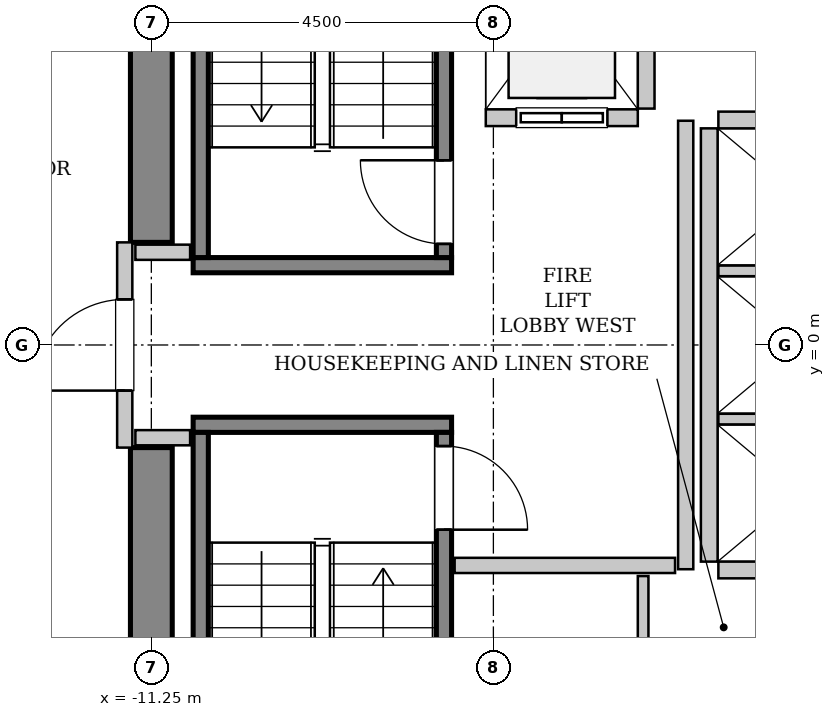
"""IFC4 building model, lengths in metres.
Left out: names, types, materials, properties, quantities, classifications, styles, units other than length and angle.
Written with IfcOpenShell. Run it as: python <this file> out.ifc"""

import sys

from ifc_helpers import new_model, si_unit, direction, frame, frame_2d, origin, place, context, subcontext, project, spatial, rectangle, extrude, source, transform, mapped, element, fill, save


model = new_model("IFC4")
c1 = context("Model", 3, precision=1e-05, world=origin(), true_north=direction((0.0, 1.0)))
c2 = subcontext(c1, "Body", "Model", "MODEL_VIEW")
j1 = project(units=[si_unit("LENGTHUNIT", "METRE"), si_unit("PLANEANGLEUNIT", "RADIAN")], contexts=[c1])
p1 = place(None, origin())
s1 = spatial("IfcSite", under=j1, at=p1, CompositionType="ELEMENT")
p2 = place(p1, origin())
s2 = spatial("IfcBuilding", under=s1, at=p2, CompositionType="ELEMENT")
p3 = place(p2, frame((0.0, 0.0, 94.6)))
s3 = spatial("IfcBuildingStorey", under=s2, at=p3, CompositionType="ELEMENT", Elevation=94.6)
m1 = source(origin(), c2, "Body", "SweptSolid", [
    extrude(rectangle(XDim=7.375, YDim=0.55, at=frame_2d((3.688, 0.0))), origin(), (0.0, 0.0, 1.0), 3.8),
])
for number, where, z_axis, x_axis in (
    (1, (-11.25, -8.725, 0.0), (0.0, 0.0, 1.0), (0.0, 1.0, 0.0)),
    (2, (-11.25, 1.35, 0.0), (0.0, 0.0, 1.0), (0.0, 1.0, 0.0)),
):
    element("IfcWall", number, at=place(p3, frame(where, z_axis=z_axis, x_axis=x_axis)), inside=s3, PredefinedType="SHEAR", context=c2, shape_type="MappedRepresentation", body=[
        mapped(m1, transform((0.0, 0.0, 0.0), x_axis=(1.0, 0.0, 0.0), y_axis=(0.0, 1.0, 0.0), z_axis=(0.0, 0.0, 1.0), scale=1.0)),
    ])
m2 = source(origin(), c2, "Body", "SweptSolid", [
    extrude(rectangle(XDim=3.4, YDim=0.2, at=frame_2d((1.7, 0.0))), origin(), (0.0, 0.0, 1.0), 3.8),
])
p4 = place(p3, frame((-7.3, 1.05, 0.0), z_axis=(0.0, 0.0, 1.0), x_axis=(-1.0, 0.0, 0.0)))
e3 = element("IfcWall", 3, at=p4, inside=s3, PredefinedType="SOLIDWALL", context=c2, shape_type="MappedRepresentation", body=[
    mapped(m2, transform((0.0, 0.0, 0.0), x_axis=(1.0, 0.0, 0.0), y_axis=(0.0, 1.0, 0.0), z_axis=(0.0, 0.0, 1.0), scale=1.0)),
])
m3 = source(origin(), c2, "Body", "SweptSolid", [
    extrude(rectangle(XDim=7.1, YDim=0.2, at=frame_2d((3.55, 0.0))), origin(), (0.0, 0.0, 1.0), 3.8),
])
p5 = place(p3, frame((-7.4, 1.15, 0.0), z_axis=(0.0, 0.0, 1.0), x_axis=(0.0, 1.0, 0.0)))
e4 = element("IfcWall", 4, at=p5, inside=s3, PredefinedType="SOLIDWALL", context=c2, shape_type="MappedRepresentation", body=[
    mapped(m3, transform((0.0, 0.0, 0.0), x_axis=(1.0, 0.0, 0.0), y_axis=(0.0, 1.0, 0.0), z_axis=(0.0, 0.0, 1.0), scale=1.0)),
])
p6 = place(p5, frame((0.18, 0.0, 0.0)))
e5 = element("IfcOpeningElement", 5, at=p6, cuts=e4, PredefinedType="OPENING", context=c2, shape_type="SweptSolid", body=[
    extrude(rectangle(XDim=1.1, YDim=2.15, at=frame_2d((0.55, 1.075))), frame((0.0, 0.11, 0.0), z_axis=(0.0, -1.0, 0.0), x_axis=(1.0, 0.0, 0.0)), (0.0, 0.0, 1.0), 0.22),
])
p7 = place(p3, frame((-10.6, 1.15, 0.0), z_axis=(0.0, 0.0, 1.0), x_axis=(0.0, 1.0, 0.0)))
e6 = element("IfcWall", 6, at=p7, inside=s3, PredefinedType="SOLIDWALL", context=c2, shape_type="MappedRepresentation", body=[
    mapped(m3, transform((0.0, 0.0, 0.0), x_axis=(1.0, 0.0, 0.0), y_axis=(0.0, 1.0, 0.0), z_axis=(0.0, 0.0, 1.0), scale=1.0)),
])
p8 = place(p3, frame((-10.7, -1.05, 0.0), z_axis=(0.0, 0.0, 1.0), x_axis=(1.0, 0.0, 0.0)))
e7 = element("IfcWall", 7, at=p8, inside=s3, PredefinedType="SOLIDWALL", context=c2, shape_type="MappedRepresentation", body=[
    mapped(m2, transform((0.0, 0.0, 0.0), x_axis=(1.0, 0.0, 0.0), y_axis=(0.0, 1.0, 0.0), z_axis=(0.0, 0.0, 1.0), scale=1.0)),
])
p9 = place(p3, frame((-10.6, -1.15, 0.0), z_axis=(0.0, 0.0, 1.0), x_axis=(0.0, -1.0, 0.0)))
e8 = element("IfcWall", 8, at=p9, inside=s3, PredefinedType="SOLIDWALL", context=c2, shape_type="MappedRepresentation", body=[
    mapped(m3, transform((0.0, 0.0, 0.0), x_axis=(1.0, 0.0, 0.0), y_axis=(0.0, 1.0, 0.0), z_axis=(0.0, 0.0, 1.0), scale=1.0)),
])
p10 = place(p3, frame((-7.4, -1.15, 0.0), z_axis=(0.0, 0.0, 1.0), x_axis=(0.0, -1.0, 0.0)))
e9 = element("IfcWall", 9, at=p10, inside=s3, PredefinedType="SOLIDWALL", context=c2, shape_type="MappedRepresentation", body=[
    mapped(m3, transform((0.0, 0.0, 0.0), x_axis=(1.0, 0.0, 0.0), y_axis=(0.0, 1.0, 0.0), z_axis=(0.0, 0.0, 1.0), scale=1.0)),
])
p11 = place(p10, frame((0.18, 0.0, 0.0)))
e10 = element("IfcOpeningElement", 10, at=p11, cuts=e9, PredefinedType="OPENING", context=c2, shape_type="SweptSolid", body=[
    extrude(rectangle(XDim=1.1, YDim=2.15, at=frame_2d((0.55, 1.075))), frame((0.0, 0.11, 0.0), z_axis=(0.0, -1.0, 0.0), x_axis=(1.0, 0.0, 0.0)), (0.0, 0.0, 1.0), 0.22),
])
m4 = source(origin(), c2, "Body", "SweptSolid", [
    extrude(rectangle(XDim=2.0, YDim=0.22, at=frame_2d((1.0, 0.0))), origin(), (0.0, 0.0, 1.0), 3.535),
])
p12 = place(p3, frame((-6.85, 2.99, 0.0), z_axis=(0.0, 0.0, 1.0), x_axis=(1.0, 0.0, 0.0)))
e11 = element("IfcWall", 11, at=p12, inside=s3, PredefinedType="SOLIDWALL", context=c2, shape_type="MappedRepresentation", body=[
    mapped(m4, transform((0.0, 0.0, 0.0), x_axis=(1.0, 0.0, 0.0), y_axis=(0.0, 1.0, 0.0), z_axis=(0.0, 0.0, 1.0), scale=1.0)),
])
p13 = place(p12, frame((0.4, 0.0, 0.0)))
e12 = element("IfcOpeningElement", 12, at=p13, cuts=e11, PredefinedType="OPENING", context=c2, shape_type="SweptSolid", body=[
    extrude(rectangle(XDim=1.2, YDim=2.2, at=frame_2d((0.6, 1.1))), frame((0.0, 0.12, 0.0), z_axis=(0.0, -1.0, 0.0), x_axis=(1.0, 0.0, 0.0)), (0.0, 0.0, 1.0), 0.24),
])
m5 = source(origin(), c2, "Body", "SweptSolid", [
    extrude(rectangle(XDim=2.68, YDim=0.22, at=frame_2d((1.34, 0.0))), origin(), (0.0, 0.0, 1.0), 3.535),
])
p14 = place(p3, frame((-4.74, 3.11, 0.0), z_axis=(0.0, 0.0, 1.0), x_axis=(0.0, 1.0, 0.0)))
e13 = element("IfcWall", 13, at=p14, inside=s3, PredefinedType="SOLIDWALL", context=c2, shape_type="MappedRepresentation", body=[
    mapped(m5, transform((0.0, 0.0, 0.0), x_axis=(1.0, 0.0, 0.0), y_axis=(0.0, 1.0, 0.0), z_axis=(0.0, 0.0, 1.0), scale=1.0)),
])
m6 = source(origin(), c2, "Body", "SweptSolid", [
    extrude(rectangle(XDim=5.7, YDim=0.22, at=frame_2d((2.85, 0.0))), origin(), (0.0, 0.0, 1.0), 3.535),
])
p15 = place(p3, frame((-3.91, 2.85, 0.0), z_axis=(0.0, 0.0, 1.0), x_axis=(0.0, -1.0, 0.0)))
e14 = element("IfcWall", 14, at=p15, inside=s3, PredefinedType="SOLIDWALL", context=c2, shape_type="MappedRepresentation", body=[
    mapped(m6, transform((0.0, 0.0, 0.0), x_axis=(1.0, 0.0, 0.0), y_axis=(0.0, 1.0, 0.0), z_axis=(0.0, 0.0, 1.0), scale=1.0)),
])
m7 = source(origin(), c2, "Body", "SweptSolid", [
    extrude(rectangle(XDim=2.13, YDim=0.22, at=frame_2d((1.065, 0.0))), origin(), (0.0, 0.0, 1.0), 3.535),
])
p16 = place(p3, frame((-3.79, -2.96, 0.0), z_axis=(0.0, 0.0, 1.0), x_axis=(1.0, 0.0, 0.0)))
e15 = element("IfcWall", 15, at=p16, inside=s3, PredefinedType="SOLIDWALL", context=c2, shape_type="MappedRepresentation", body=[
    mapped(m7, transform((0.0, 0.0, 0.0), x_axis=(1.0, 0.0, 0.0), y_axis=(0.0, 1.0, 0.0), z_axis=(0.0, 0.0, 1.0), scale=1.0)),
])
m8 = source(origin(), c2, "Body", "SweptSolid", [
    extrude(rectangle(XDim=2.13, YDim=0.14, at=frame_2d((1.065, 0.0))), origin(), (0.0, 0.0, 1.0), 3.535),
])
for number, where, z_axis, x_axis in (
    (16, (-3.79, -0.975, 0.0), (0.0, 0.0, 1.0), (1.0, 0.0, 0.0)),
    (17, (-3.79, 0.975, 0.0), (0.0, 0.0, 1.0), (1.0, 0.0, 0.0)),
):
    element("IfcWall", number, at=place(p3, frame(where, z_axis=z_axis, x_axis=x_axis)), inside=s3, PredefinedType="PARTITIONING", context=c2, shape_type="MappedRepresentation", body=[
        mapped(m8, transform((0.0, 0.0, 0.0), x_axis=(1.0, 0.0, 0.0), y_axis=(0.0, 1.0, 0.0), z_axis=(0.0, 0.0, 1.0), scale=1.0)),
    ])
p17 = place(p3, frame((-1.66, 2.96, 0.0), z_axis=(0.0, 0.0, 1.0), x_axis=(-1.0, 0.0, 0.0)))
e18 = element("IfcWall", 18, at=p17, inside=s3, PredefinedType="SOLIDWALL", context=c2, shape_type="MappedRepresentation", body=[
    mapped(m7, transform((0.0, 0.0, 0.0), x_axis=(1.0, 0.0, 0.0), y_axis=(0.0, 1.0, 0.0), z_axis=(0.0, 0.0, 1.0), scale=1.0)),
])
m9 = source(origin(), c2, "Body", "SweptSolid", [
    extrude(rectangle(XDim=2.7, YDim=0.2, at=frame_2d((1.35, 0.0))), origin(), (0.0, 0.0, 1.0), 2.425),
])
p18 = place(p3, frame((-11.6, -1.35, 0.0), z_axis=(0.0, 0.0, 1.0), x_axis=(0.0, 1.0, 0.0)))
e19 = element("IfcWall", 19, at=p18, inside=s3, PredefinedType="PARTITIONING", context=c2, shape_type="MappedRepresentation", body=[
    mapped(m9, transform((0.0, 0.0, 0.0), x_axis=(1.0, 0.0, 0.0), y_axis=(0.0, 1.0, 0.0), z_axis=(0.0, 0.0, 1.0), scale=1.0)),
])
p19 = place(p18, frame((0.75, 0.0, 0.0)))
e20 = element("IfcOpeningElement", 20, at=p19, cuts=e19, PredefinedType="OPENING", context=c2, shape_type="SweptSolid", body=[
    extrude(rectangle(XDim=1.2, YDim=2.15, at=frame_2d((0.6, 1.075))), frame((0.0, 0.11, 0.0), z_axis=(0.0, -1.0, 0.0), x_axis=(1.0, 0.0, 0.0)), (0.0, 0.0, 1.0), 0.22),
])
m10 = source(origin(), c2, "Body", "SweptSolid", [
    extrude(rectangle(XDim=5.9, YDim=0.2, at=frame_2d((2.95, 0.0))), origin(), (0.0, 0.0, 1.0), 3.535),
])
p20 = place(p3, frame((-4.22, -2.95, 0.0), z_axis=(0.0, 0.0, 1.0), x_axis=(0.0, 1.0, 0.0)))
e21 = element("IfcWall", 21, at=p20, inside=s3, PredefinedType="PARTITIONING", context=c2, shape_type="MappedRepresentation", body=[
    mapped(m10, transform((0.0, 0.0, 0.0), x_axis=(1.0, 0.0, 0.0), y_axis=(0.0, 1.0, 0.0), z_axis=(0.0, 0.0, 1.0), scale=1.0)),
])
m11 = source(origin(), c2, "Body", "SweptSolid", [
    extrude(rectangle(XDim=2.9, YDim=0.2, at=frame_2d((1.45, 0.0))), origin(), (0.0, 0.0, 1.0), 3.535),
])
p21 = place(p3, frame((-7.26, -2.9, 0.0), z_axis=(0.0, 0.0, 1.0), x_axis=(1.0, 0.0, 0.0)))
e22 = element("IfcWall", 22, at=p21, inside=s3, PredefinedType="PARTITIONING", context=c2, shape_type="MappedRepresentation", body=[
    mapped(m11, transform((0.0, 0.0, 0.0), x_axis=(1.0, 0.0, 0.0), y_axis=(0.0, 1.0, 0.0), z_axis=(0.0, 0.0, 1.0), scale=1.0)),
])
m12 = source(origin(), c2, "Body", "SweptSolid", [
    extrude(rectangle(XDim=0.72, YDim=0.2, at=frame_2d((0.36, 0.0))), origin(), (0.0, 0.0, 1.0), 3.535),
])
for number, where, z_axis, x_axis in (
    (23, (-11.46, 1.22, 0.0), (0.0, 0.0, 1.0), (1.0, 0.0, 0.0)),
    (24, (-11.46, -1.22, 0.0), (0.0, 0.0, 1.0), (1.0, 0.0, 0.0)),
):
    element("IfcWall", number, at=place(p3, frame(where, z_axis=z_axis, x_axis=x_axis)), inside=s3, PredefinedType="PARTITIONING", context=c2, shape_type="MappedRepresentation", body=[
        mapped(m12, transform((0.0, 0.0, 0.0), x_axis=(1.0, 0.0, 0.0), y_axis=(0.0, 1.0, 0.0), z_axis=(0.0, 0.0, 1.0), scale=1.0)),
    ])
m13 = source(origin(), c2, "Body", "SweptSolid", [
    extrude(rectangle(XDim=1.26, YDim=0.14, at=frame_2d((0.63, 0.0))), origin(), (0.0, 0.0, 1.0), 3.535),
])
p22 = place(p3, frame((-4.78, -4.3, 0.0), z_axis=(0.0, 0.0, 1.0), x_axis=(0.0, 1.0, 0.0)))
e25 = element("IfcWall", 25, at=p22, inside=s3, PredefinedType="PARTITIONING", context=c2, shape_type="MappedRepresentation", body=[
    mapped(m13, transform((0.0, 0.0, 0.0), x_axis=(1.0, 0.0, 0.0), y_axis=(0.0, 1.0, 0.0), z_axis=(0.0, 0.0, 1.0), scale=1.0)),
])
m14 = source(origin(), c2, "Body", "SweptSolid", [
    extrude(rectangle(XDim=1.1, YDim=2.15, at=frame_2d((0.55, 1.075))), frame((0.0, 0.025, 0.0), z_axis=(0.0, -1.0, 0.0), x_axis=(1.0, 0.0, 0.0)), (0.0, 0.0, 1.0), 0.05),
])
p23 = place(p6, origin())
e26 = element("IfcDoor", 26, at=p23, inside=s3, OperationType="SINGLE_SWING_RIGHT", PredefinedType="DOOR", context=c2, shape_type="MappedRepresentation", body=[
    mapped(m14, transform((0.0, 0.0, 0.0), x_axis=(1.0, 0.0, 0.0), y_axis=(0.0, 1.0, 0.0), z_axis=(0.0, 0.0, 1.0), scale=1.0)),
])
fill(e5, e26)
p24 = place(p11, origin())
e27 = element("IfcDoor", 27, at=p24, inside=s3, OperationType="SINGLE_SWING_RIGHT", PredefinedType="DOOR", context=c2, shape_type="MappedRepresentation", body=[
    mapped(m14, transform((0.0, 0.0, 0.0), x_axis=(1.0, 0.0, 0.0), y_axis=(0.0, 1.0, 0.0), z_axis=(0.0, 0.0, 1.0), scale=1.0)),
])
fill(e10, e27)
m15 = source(origin(), c2, "Body", "SweptSolid", [
    extrude(rectangle(XDim=1.2, YDim=2.2, at=frame_2d((0.6, 1.1))), frame((0.0, 0.025, 0.0), z_axis=(0.0, -1.0, 0.0), x_axis=(1.0, 0.0, 0.0)), (0.0, 0.0, 1.0), 0.05),
])
p25 = place(p13, origin())
e28 = element("IfcDoor", 28, at=p25, inside=s3, OperationType="SLIDING_TO_LEFT", PredefinedType="DOOR", context=c2, shape_type="MappedRepresentation", body=[
    mapped(m15, transform((0.0, 0.0, 0.0), x_axis=(1.0, 0.0, 0.0), y_axis=(0.0, 1.0, 0.0), z_axis=(0.0, 0.0, 1.0), scale=1.0)),
])
fill(e12, e28)
m16 = source(origin(), c2, "Body", "SweptSolid", [
    extrude(rectangle(XDim=1.2, YDim=2.15, at=frame_2d((0.6, 1.075))), frame((0.0, 0.025, 0.0), z_axis=(0.0, -1.0, 0.0), x_axis=(1.0, 0.0, 0.0)), (0.0, 0.0, 1.0), 0.05),
])
p26 = place(p19, origin())
e29 = element("IfcDoor", 29, at=p26, inside=s3, OperationType="SINGLE_SWING_LEFT", PredefinedType="DOOR", context=c2, shape_type="MappedRepresentation", body=[
    mapped(m16, transform((0.0, 0.0, 0.0), x_axis=(1.0, 0.0, 0.0), y_axis=(0.0, 1.0, 0.0), z_axis=(0.0, 0.0, 1.0), scale=1.0)),
])
fill(e20, e29)
save(model, sys.argv[1])
